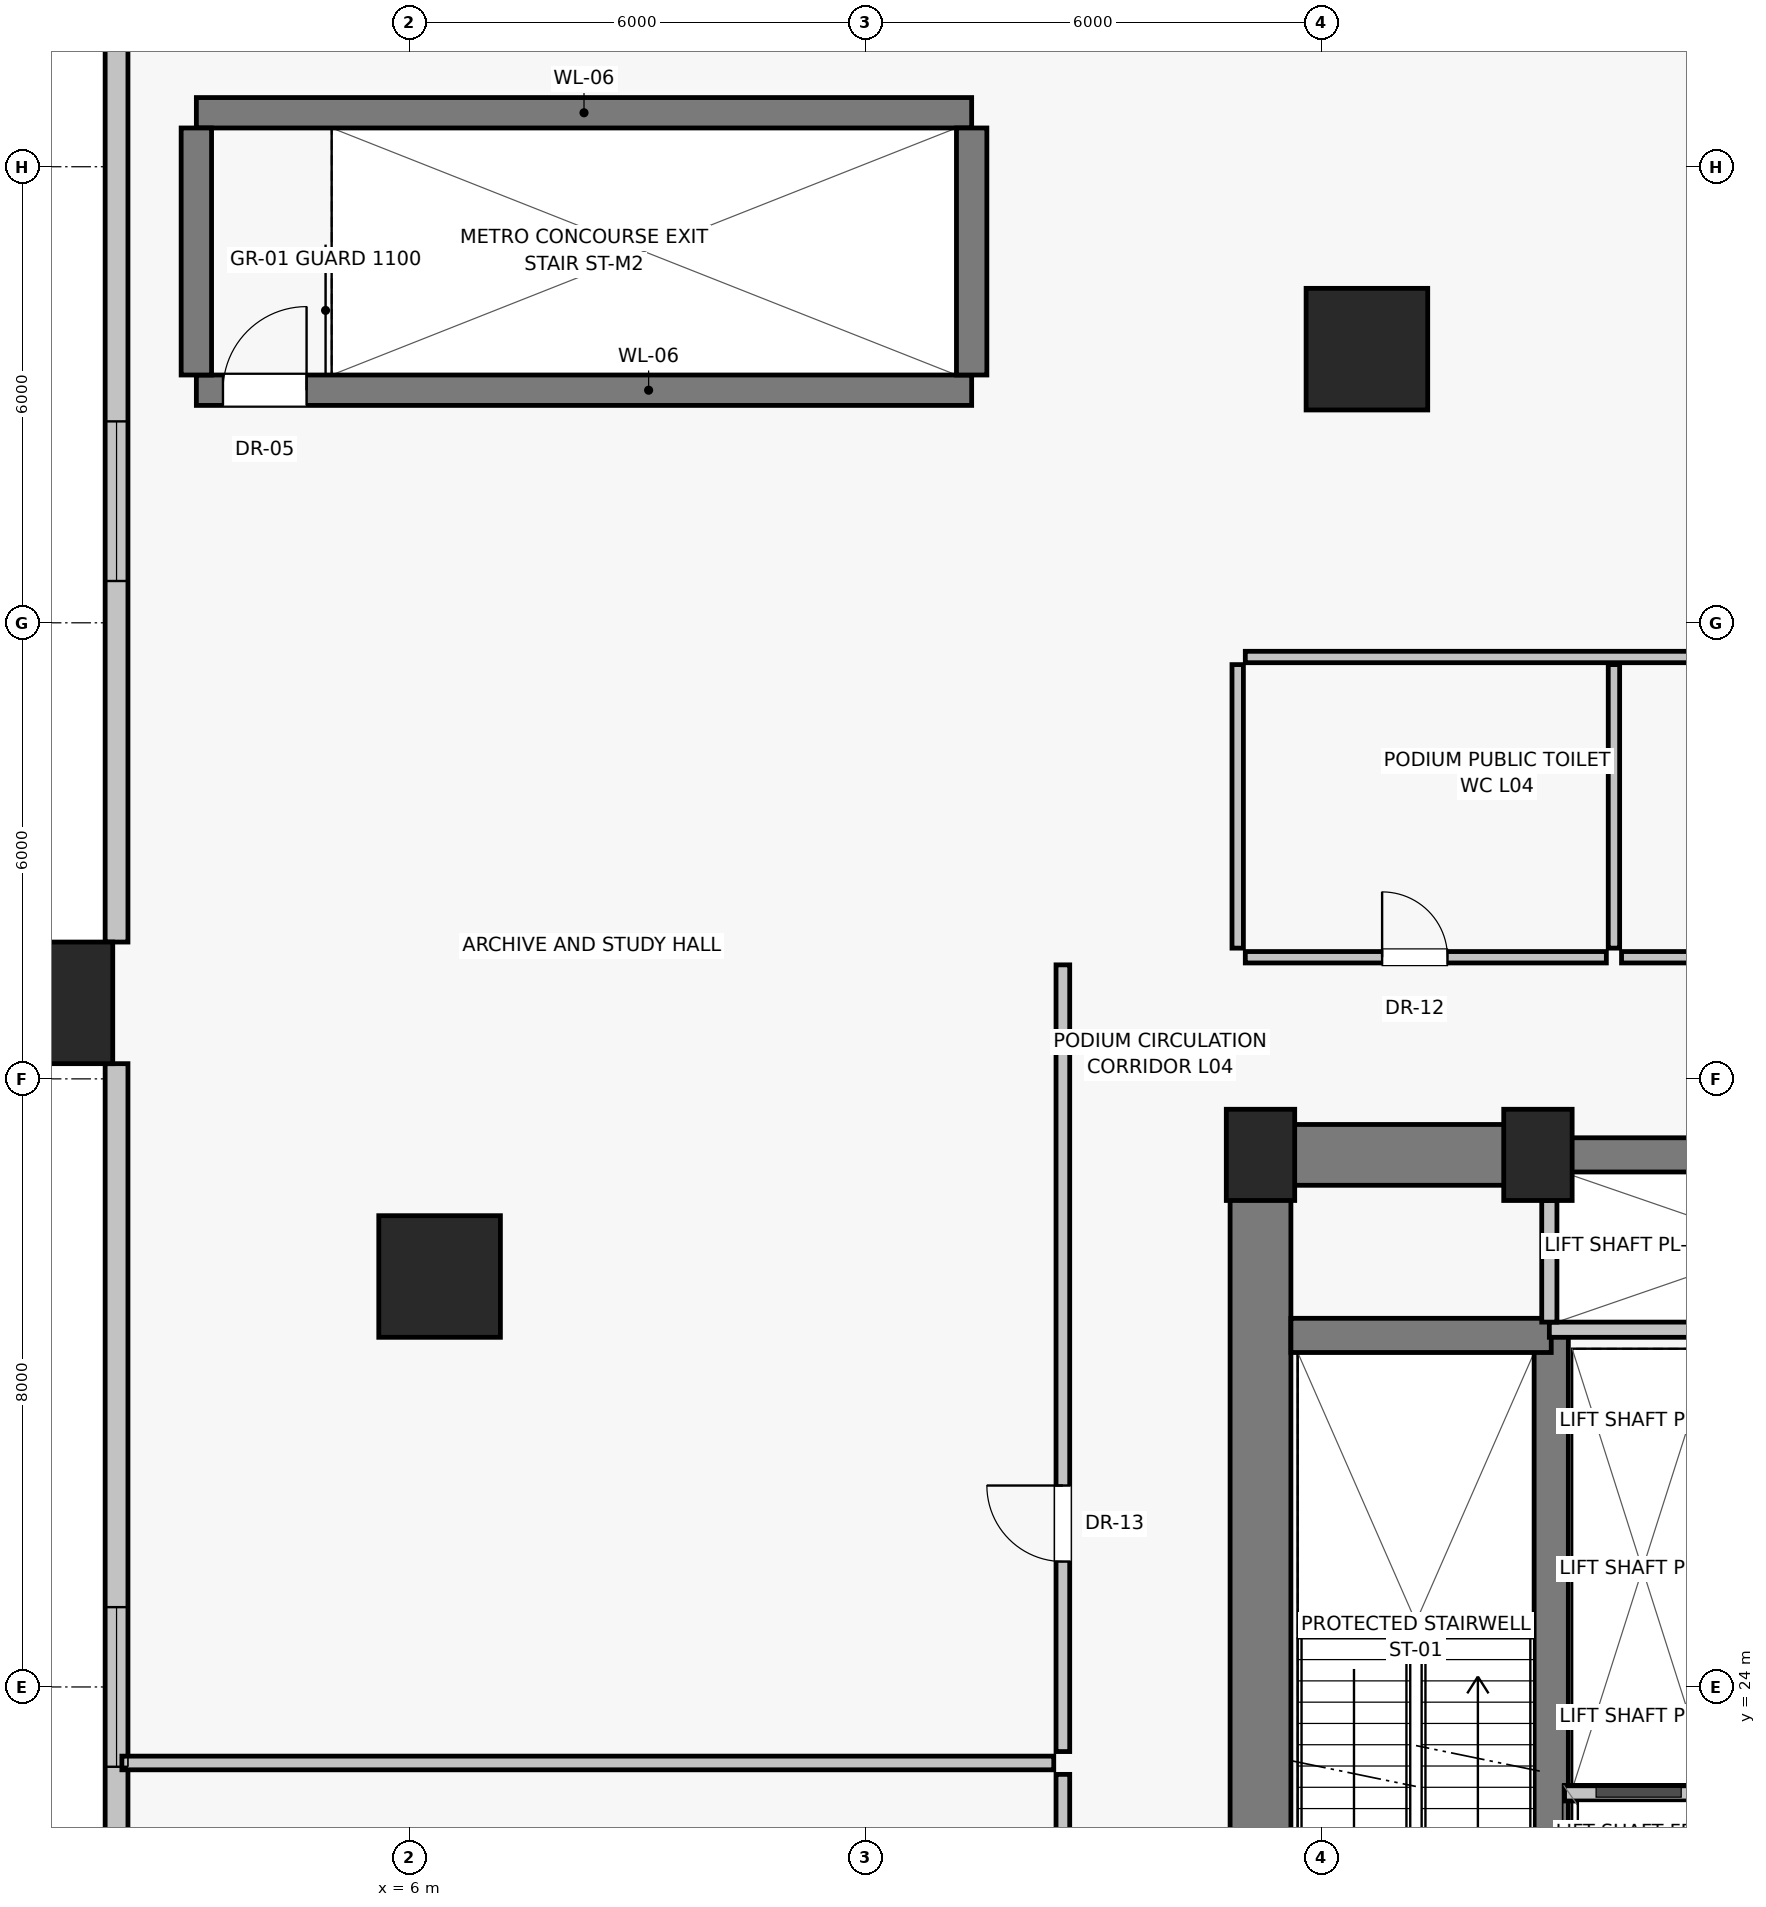
"""IFC4 building model, lengths in metres.
Left out: names, types, materials, properties, quantities, classifications, styles, units other than length and angle.
Written with IfcOpenShell. Run it as: python <this file> out.ifc"""

import sys

from ifc_helpers import new_model, si_unit, direction, frame, frame_2d, origin, origin_2d, place, context, subcontext, project, spatial, rectangle, extrude, source, transform, mapped, element, fill, save


model = new_model("IFC4")
c1 = context("Model", 3, precision=1e-05, world=origin(), true_north=direction((0.0, 1.0)))
c2 = subcontext(c1, "Body", "Model", "MODEL_VIEW")
j1 = project(units=[si_unit("LENGTHUNIT", "METRE"), si_unit("PLANEANGLEUNIT", "RADIAN")], contexts=[c1])
p1 = place(None, origin())
s1 = spatial("IfcSite", under=j1, at=p1, CompositionType="ELEMENT")
p2 = place(p1, origin())
s2 = spatial("IfcBuilding", under=s1, at=p2, CompositionType="ELEMENT")
p3 = place(p2, frame((0.0, 0.0, 18.4)))
s3 = spatial("IfcBuildingStorey", under=s2, at=p3, CompositionType="ELEMENT", Elevation=18.4)
for number, where, z_axis, x_axis in (
    (1, (17.2, 31.0, 0.0), (0.0, 0.0, 1.0), (1.0, 0.0, 0.0)),
    (2, (20.85, 31.0, 0.0), (0.0, 0.0, 1.0), (1.0, 0.0, 0.0)),
):
    element("IfcColumn", number, at=place(p3, frame(where, z_axis=z_axis, x_axis=x_axis)), inside=s3, PredefinedType="PILASTER", context=c2, shape_type="SweptSolid", body=[
        extrude(rectangle(XDim=0.9, YDim=1.2, at=origin_2d()), origin(), (0.0, 0.0, 1.0), 4.4),
    ])
for number, where, z_axis, x_axis in (
    (3, (1.3, 33.0, 0.0), (0.0, 0.0, 1.0), (1.0, 0.0, 0.0)),
    (4, (18.6, 41.6, 0.0), (0.0, 0.0, 1.0), (1.0, 0.0, 0.0)),
    (5, (6.4, 29.4, 0.0), (0.0, 0.0, 1.0), (1.0, 0.0, 0.0)),
):
    element("IfcColumn", number, at=place(p3, frame(where, z_axis=z_axis, x_axis=x_axis)), inside=s3, PredefinedType="COLUMN", context=c2, shape_type="SweptSolid", body=[
        extrude(rectangle(XDim=1.6, YDim=1.6, at=origin_2d()), origin(), (0.0, 0.0, 1.0), 4.4),
    ])
p4 = place(p3, frame((2.15, 45.7, 0.0), z_axis=(0.0, 0.0, 1.0), x_axis=(0.0, -1.0, 0.0)))
e6 = element("IfcWall", 6, at=p4, inside=s3, PredefinedType="SOLIDWALL", context=c2, shape_type="SweptSolid", body=[
    extrude(rectangle(XDim=11.9, YDim=0.3, at=frame_2d((5.95, 0.0))), origin(), (0.0, 0.0, 1.0), 2.95),
])
p5 = place(p4, frame((5.05, 0.0, 0.85)))
e7 = element("IfcOpeningElement", 7, at=p5, cuts=e6, PredefinedType="OPENING", context=c2, shape_type="SweptSolid", body=[
    extrude(rectangle(XDim=2.1, YDim=1.75, at=frame_2d((1.05, 0.875))), frame((0.0, 0.16, 0.0), z_axis=(0.0, -1.0, 0.0), x_axis=(1.0, 0.0, 0.0)), (0.0, 0.0, 1.0), 0.32),
])
p6 = place(p3, frame((2.15, 32.2, 0.0), z_axis=(0.0, 0.0, 1.0), x_axis=(0.0, -1.0, 0.0)))
e8 = element("IfcWall", 8, at=p6, inside=s3, PredefinedType="SOLIDWALL", context=c2, shape_type="SweptSolid", body=[
    extrude(rectangle(XDim=16.4, YDim=0.3, at=frame_2d((8.2, 0.0))), origin(), (0.0, 0.0, 1.0), 2.95),
])
p7 = place(p6, frame((7.15, 0.0, 0.85)))
e9 = element("IfcOpeningElement", 9, at=p7, cuts=e8, PredefinedType="OPENING", context=c2, shape_type="SweptSolid", body=[
    extrude(rectangle(XDim=2.1, YDim=1.75, at=frame_2d((1.05, 0.875))), frame((0.0, 0.16, 0.0), z_axis=(0.0, -1.0, 0.0), x_axis=(1.0, 0.0, 0.0)), (0.0, 0.0, 1.0), 0.32),
])
p8 = place(p3, frame((17.2, 16.8, 0.0), z_axis=(0.0, 0.0, 1.0), x_axis=(0.0, 1.0, 0.0)))
e10 = element("IfcWall", 10, at=p8, inside=s3, PredefinedType="SHEAR", context=c2, shape_type="SweptSolid", body=[
    extrude(rectangle(XDim=14.2, YDim=0.8, at=frame_2d((7.1, 0.0))), origin(), (0.0, 0.0, 1.0), 4.05),
])
p9 = place(p3, frame((17.2, 31.0, 0.0), z_axis=(0.0, 0.0, 1.0), x_axis=(1.0, 0.0, 0.0)))
e11 = element("IfcWall", 11, at=p9, inside=s3, PredefinedType="SHEAR", context=c2, shape_type="SweptSolid", body=[
    extrude(rectangle(XDim=3.8, YDim=0.8, at=frame_2d((1.9, 0.0))), origin(), (0.0, 0.0, 1.0), 4.05),
])
p10 = place(p3, frame((21.0, 31.0, 0.0), z_axis=(0.0, 0.0, 1.0), x_axis=(1.0, 0.0, 0.0)))
e12 = element("IfcWall", 12, at=p10, inside=s3, PredefinedType="SHEAR", context=c2, shape_type="SweptSolid", body=[
    extrude(rectangle(XDim=6.0, YDim=0.45, at=frame_2d((3.0, 0.0))), origin(), (0.0, 0.0, 1.0), 4.05),
])
p11 = place(p3, frame((21.025, 19.8, 0.0), z_axis=(0.0, 0.0, 1.0), x_axis=(0.0, 1.0, 0.0)))
e13 = element("IfcWall", 13, at=p11, inside=s3, PredefinedType="SHEAR", context=c2, shape_type="SweptSolid", body=[
    extrude(rectangle(XDim=8.825, YDim=0.45, at=frame_2d((4.413, 0.0))), origin(), (0.0, 0.0, 1.0), 4.05),
])
p12 = place(p3, frame((17.6, 28.625, 0.0), z_axis=(0.0, 0.0, 1.0), x_axis=(1.0, 0.0, 0.0)))
e14 = element("IfcWall", 14, at=p12, inside=s3, PredefinedType="SHEAR", context=c2, shape_type="SweptSolid", body=[
    extrude(rectangle(XDim=3.425, YDim=0.45, at=frame_2d((1.712, 0.0))), origin(), (0.0, 0.0, 1.0), 4.05),
])
p13 = place(p3, frame((21.2, 22.6, 0.0), z_axis=(0.0, 0.0, 1.0), x_axis=(1.0, 0.0, 0.0)))
e15 = element("IfcWall", 15, at=p13, inside=s3, PredefinedType="SOLIDWALL", context=c2, shape_type="SweptSolid", body=[
    extrude(rectangle(XDim=1.95, YDim=0.2, at=frame_2d((0.975, 0.0))), origin(), (0.0, 0.0, 1.0), 4.05),
])
p14 = place(p3, frame((21.0, 28.7, 0.0), z_axis=(0.0, 0.0, 1.0), x_axis=(1.0, 0.0, 0.0)))
e16 = element("IfcWall", 16, at=p14, inside=s3, PredefinedType="SOLIDWALL", context=c2, shape_type="SweptSolid", body=[
    extrude(rectangle(XDim=6.0, YDim=0.2, at=frame_2d((3.0, 0.0))), origin(), (0.0, 0.0, 1.0), 4.05),
])
p15 = place(p3, frame((21.0, 28.8, 0.0), z_axis=(0.0, 0.0, 1.0), x_axis=(0.0, 1.0, 0.0)))
e17 = element("IfcWall", 17, at=p15, inside=s3, PredefinedType="SOLIDWALL", context=c2, shape_type="SweptSolid", body=[
    extrude(rectangle(XDim=1.6, YDim=0.2, at=frame_2d((0.8, 0.0))), origin(), (0.0, 0.0, 1.0), 4.05),
])
p16 = place(p3, frame((3.2, 41.06, 0.0), z_axis=(0.0, 0.0, 1.0), x_axis=(1.0, 0.0, 0.0)))
e18 = element("IfcWall", 18, at=p16, inside=s3, PredefinedType="SHEAR", context=c2, shape_type="SweptSolid", body=[
    extrude(rectangle(XDim=10.2, YDim=0.4, at=frame_2d((5.1, 0.0))), origin(), (0.0, 0.0, 1.0), 4.05),
])
p17 = place(p16, frame((0.35, 0.0, 0.0)))
e19 = element("IfcOpeningElement", 19, at=p17, cuts=e18, PredefinedType="OPENING", context=c2, shape_type="SweptSolid", body=[
    extrude(rectangle(XDim=1.1, YDim=2.03, at=frame_2d((0.55, 1.015))), frame((0.0, 0.21, 0.0), z_axis=(0.0, -1.0, 0.0), x_axis=(1.0, 0.0, 0.0)), (0.0, 0.0, 1.0), 0.42),
])
p18 = place(p3, frame((3.2, 44.71, 0.0), z_axis=(0.0, 0.0, 1.0), x_axis=(1.0, 0.0, 0.0)))
e20 = element("IfcWall", 20, at=p18, inside=s3, PredefinedType="SHEAR", context=c2, shape_type="SweptSolid", body=[
    extrude(rectangle(XDim=10.2, YDim=0.4, at=frame_2d((5.1, 0.0))), origin(), (0.0, 0.0, 1.0), 4.05),
])
for number, where, z_axis, x_axis in (
    (21, (3.2, 41.26, 0.0), (0.0, 0.0, 1.0), (0.0, 1.0, 0.0)),
    (22, (13.4, 41.26, 0.0), (0.0, 0.0, 1.0), (0.0, 1.0, 0.0)),
):
    element("IfcWall", number, at=place(p3, frame(where, z_axis=z_axis, x_axis=x_axis)), inside=s3, PredefinedType="SHEAR", context=c2, shape_type="SweptSolid", body=[
        extrude(rectangle(XDim=3.25, YDim=0.4, at=frame_2d((1.625, 0.0))), origin(), (0.0, 0.0, 1.0), 4.05),
    ])
p19 = place(p3, frame((14.6, 14.3, 0.0), z_axis=(0.0, 0.0, 1.0), x_axis=(0.0, 1.0, 0.0)))
e23 = element("IfcWall", 23, at=p19, inside=s3, PredefinedType="PARTITIONING", context=c2, shape_type="SweptSolid", body=[
    extrude(rectangle(XDim=8.55, YDim=0.18, at=frame_2d((4.275, 0.0))), origin(), (0.0, 0.0, 1.0), 4.05),
])
p20 = place(p19, frame((2.5, 0.0, 0.0)))
e24 = element("IfcOpeningElement", 24, at=p20, cuts=e23, PredefinedType="OPENING", context=c2, shape_type="SweptSolid", body=[
    extrude(rectangle(XDim=1.0, YDim=2.01, at=frame_2d((0.5, 1.005))), frame((0.0, 0.1, 0.0), z_axis=(0.0, -1.0, 0.0), x_axis=(1.0, 0.0, 0.0)), (0.0, 0.0, 1.0), 0.2),
])
p21 = place(p3, frame((14.6, 23.15, 0.0), z_axis=(0.0, 0.0, 1.0), x_axis=(0.0, 1.0, 0.0)))
e25 = element("IfcWall", 25, at=p21, inside=s3, PredefinedType="PARTITIONING", context=c2, shape_type="SweptSolid", body=[
    extrude(rectangle(XDim=10.35, YDim=0.18, at=frame_2d((5.175, 0.0))), origin(), (0.0, 0.0, 1.0), 4.05),
])
p22 = place(p21, frame((2.5, 0.0, 0.0)))
e26 = element("IfcOpeningElement", 26, at=p22, cuts=e25, PredefinedType="OPENING", context=c2, shape_type="SweptSolid", body=[
    extrude(rectangle(XDim=1.0, YDim=2.01, at=frame_2d((0.5, 1.005))), frame((0.0, 0.1, 0.0), z_axis=(0.0, -1.0, 0.0), x_axis=(1.0, 0.0, 0.0)), (0.0, 0.0, 1.0), 0.2),
])
p23 = place(p3, frame((2.22, 23.0, 0.0), z_axis=(0.0, 0.0, 1.0), x_axis=(1.0, 0.0, 0.0)))
e27 = element("IfcWall", 27, at=p23, inside=s3, PredefinedType="PARTITIONING", context=c2, shape_type="SweptSolid", body=[
    extrude(rectangle(XDim=12.26, YDim=0.18, at=frame_2d((6.13, 0.0))), origin(), (0.0, 0.0, 1.0), 4.05),
])
p24 = place(p3, frame((17.0, 33.6, 0.0), z_axis=(0.0, 0.0, 1.0), x_axis=(1.0, 0.0, 0.0)))
e28 = element("IfcWall", 28, at=p24, inside=s3, PredefinedType="PARTITIONING", context=c2, shape_type="SweptSolid", body=[
    extrude(rectangle(XDim=4.75, YDim=0.15, at=frame_2d((2.375, 0.0))), origin(), (0.0, 0.0, 1.0), 4.05),
])
p25 = place(p24, frame((1.8, 0.0, 0.0)))
e29 = element("IfcOpeningElement", 29, at=p25, cuts=e28, PredefinedType="OPENING", context=c2, shape_type="SweptSolid", body=[
    extrude(rectangle(XDim=0.86, YDim=2.01, at=frame_2d((0.43, 1.005))), frame((0.0, 0.085, 0.0), z_axis=(0.0, -1.0, 0.0), x_axis=(1.0, 0.0, 0.0)), (0.0, 0.0, 1.0), 0.17),
])
p26 = place(p3, frame((21.95, 33.6, 0.0), z_axis=(0.0, 0.0, 1.0), x_axis=(1.0, 0.0, 0.0)))
e30 = element("IfcWall", 30, at=p26, inside=s3, PredefinedType="PARTITIONING", context=c2, shape_type="SweptSolid", body=[
    extrude(rectangle(XDim=4.2, YDim=0.15, at=frame_2d((2.1, 0.0))), origin(), (0.0, 0.0, 1.0), 4.05),
])
p27 = place(p26, frame((1.5, 0.0, 0.0)))
e31 = element("IfcOpeningElement", 31, at=p27, cuts=e30, PredefinedType="OPENING", context=c2, shape_type="SweptSolid", body=[
    extrude(rectangle(XDim=1.0, YDim=2.01, at=frame_2d((0.5, 1.005))), frame((0.0, 0.085, 0.0), z_axis=(0.0, -1.0, 0.0), x_axis=(1.0, 0.0, 0.0)), (0.0, 0.0, 1.0), 0.17),
])
for number, where, z_axis, x_axis in (
    (32, (16.9, 33.72, 0.0), (0.0, 0.0, 1.0), (0.0, 1.0, 0.0)),
    (33, (21.85, 33.72, 0.0), (0.0, 0.0, 1.0), (0.0, 1.0, 0.0)),
):
    element("IfcWall", number, at=place(p3, frame(where, z_axis=z_axis, x_axis=x_axis)), inside=s3, PredefinedType="PARTITIONING", context=c2, shape_type="SweptSolid", body=[
        extrude(rectangle(XDim=3.73, YDim=0.15, at=frame_2d((1.865, 0.0))), origin(), (0.0, 0.0, 1.0), 4.05),
    ])
p28 = place(p3, frame((17.0, 37.55, 0.0), z_axis=(0.0, 0.0, 1.0), x_axis=(1.0, 0.0, 0.0)))
e34 = element("IfcWall", 34, at=p28, inside=s3, PredefinedType="PARTITIONING", context=c2, shape_type="SweptSolid", body=[
    extrude(rectangle(XDim=9.15, YDim=0.15, at=frame_2d((4.575, 0.0))), origin(), (0.0, 0.0, 1.0), 4.05),
])
m1 = source(origin(), c2, "Body", "SweptSolid", [
    extrude(rectangle(XDim=2.1, YDim=1.75, at=frame_2d((1.05, 0.875))), frame((0.0, 0.03, 0.0), z_axis=(0.0, -1.0, 0.0), x_axis=(1.0, 0.0, 0.0)), (0.0, 0.0, 1.0), 0.06),
])
p29 = place(p5, origin())
e35 = element("IfcWindow", 35, at=p29, inside=s3, PartitioningType="DOUBLE_PANEL_VERTICAL", PredefinedType="WINDOW", context=c2, shape_type="MappedRepresentation", body=[
    mapped(m1, transform((0.0, 0.0, 0.0), scale=1.0)),
])
fill(e7, e35)
p30 = place(p7, origin())
e36 = element("IfcWindow", 36, at=p30, inside=s3, PartitioningType="DOUBLE_PANEL_VERTICAL", PredefinedType="WINDOW", context=c2, shape_type="MappedRepresentation", body=[
    mapped(m1, transform((0.0, 0.0, 0.0), scale=1.0)),
])
fill(e9, e36)
m2 = source(origin(), c2, "Body", "SweptSolid", [
    extrude(rectangle(XDim=1.1, YDim=2.03, at=frame_2d((0.55, 1.015))), frame((0.0, 0.025, 0.0), z_axis=(0.0, -1.0, 0.0), x_axis=(1.0, 0.0, 0.0)), (0.0, 0.0, 1.0), 0.05),
])
p31 = place(p17, origin())
e37 = element("IfcDoor", 37, at=p31, inside=s3, OperationType="SINGLE_SWING_RIGHT", PredefinedType="DOOR", context=c2, shape_type="MappedRepresentation", body=[
    mapped(m2, transform((0.0, 0.0, 0.0), scale=1.0)),
])
fill(e19, e37)
m3 = source(origin(), c2, "Body", "SweptSolid", [
    extrude(rectangle(XDim=1.0, YDim=2.01, at=frame_2d((0.5, 1.005))), frame((0.0, 0.025, 0.0), z_axis=(0.0, -1.0, 0.0), x_axis=(1.0, 0.0, 0.0)), (0.0, 0.0, 1.0), 0.05),
])
p32 = place(p22, origin())
e38 = element("IfcDoor", 38, at=p32, inside=s3, OperationType="SINGLE_SWING_RIGHT", PredefinedType="DOOR", context=c2, shape_type="MappedRepresentation", body=[
    mapped(m3, transform((0.0, 0.0, 0.0), scale=1.0)),
])
fill(e26, e38)
m4 = source(origin(), c2, "Body", "SweptSolid", [
    extrude(rectangle(XDim=0.86, YDim=2.01, at=frame_2d((0.43, 1.005))), frame((0.0, 0.025, 0.0), z_axis=(0.0, -1.0, 0.0), x_axis=(1.0, 0.0, 0.0)), (0.0, 0.0, 1.0), 0.05),
])
p33 = place(p25, origin())
e39 = element("IfcDoor", 39, at=p33, inside=s3, OperationType="SINGLE_SWING_LEFT", PredefinedType="DOOR", context=c2, shape_type="MappedRepresentation", body=[
    mapped(m4, transform((0.0, 0.0, 0.0), scale=1.0)),
])
fill(e29, e39)
save(model, sys.argv[1])
